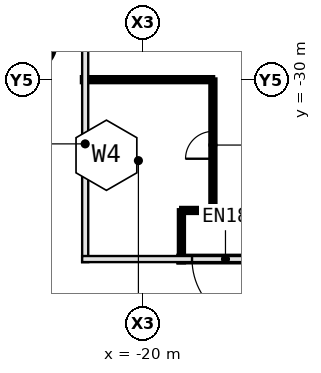
"""IFC4 building model, lengths in metres.
Left out: names, types, materials, properties, quantities, classifications, styles, units other than length and angle.
Written with IfcOpenShell. Run it as: python <this file> out.ifc"""

import sys

from ifc_helpers import new_model, si_unit, direction, frame, frame_2d, origin, origin_2d, place, context, subcontext, project, spatial, rectangle, circle, extrude, element, fill, save


model = new_model("IFC4")
c1 = context("Model", 3, precision=1e-05, world=origin(), true_north=direction((0.0, 1.0)))
c2 = subcontext(c1, "Body", "Model", "MODEL_VIEW")
j1 = project(units=[si_unit("LENGTHUNIT", "METRE"), si_unit("PLANEANGLEUNIT", "RADIAN")], contexts=[c1])
p1 = place(None, origin())
s1 = spatial("IfcSite", under=j1, at=p1, CompositionType="ELEMENT")
p2 = place(p1, origin())
s2 = spatial("IfcBuilding", under=s1, at=p2, CompositionType="ELEMENT")
p3 = place(p2, origin())
s3 = spatial("IfcBuildingStorey", under=s2, at=p3, CompositionType="ELEMENT", Elevation=0.0)
p4 = place(p3, frame((-23.782, -28.799, 0.0), z_axis=(0.0, 0.0, 1.0), x_axis=(-0.819152044289, -0.573576436351, 0.0)))
e1 = element("IfcColumn", 1, at=p4, inside=s3, PredefinedType="COLUMN", context=c2, shape_type="SweptSolid", body=[
    extrude(circle(Radius=0.9, at=origin_2d()), origin(), (0.0, 0.0, 1.0), 9.0),
])
p5 = place(p3, frame((-15.744, -35.9, 0.0), z_axis=(0.0, 0.0, 1.0), x_axis=(-1.0, 0.0, 0.0)))
e2 = element("IfcWall", 2, at=p5, inside=s3, PredefinedType="SOLIDWALL", context=c2, shape_type="SweptSolid", body=[
    extrude(rectangle(XDim=3.083, YDim=0.2, at=frame_2d((1.542, 0.0))), origin(), (0.0, 0.0, 1.0), 2.7),
])
p6 = place(p5, frame((0.441, 0.0, 0.0)))
e3 = element("IfcOpeningElement", 3, at=p6, cuts=e2, PredefinedType="OPENING", context=c2, shape_type="SweptSolid", body=[
    extrude(rectangle(XDim=2.2, YDim=2.4, at=frame_2d((1.1, 1.2))), frame((0.0, 0.11, 0.0), z_axis=(0.0, -1.0, 0.0), x_axis=(1.0, 0.0, 0.0)), (0.0, 0.0, 1.0), 0.22),
])
p7 = place(p3, frame((-18.735, -36.0, 0.0), z_axis=(0.0, 0.0, 1.0), x_axis=(0.0, 1.0, 0.0)))
e4 = element("IfcWall", 4, at=p7, inside=s3, PredefinedType="PARTITIONING", context=c2, shape_type="SweptSolid", body=[
    extrude(rectangle(XDim=1.699, YDim=0.15, at=frame_2d((0.85, 0.0))), origin(), (0.0, 0.0, 1.0), 8.6),
])
p8 = place(p3, frame((-18.735, -34.301, 0.0), z_axis=(0.0, 0.0, 1.0), x_axis=(1.0, 0.0, 0.0)))
e5 = element("IfcWall", 5, at=p8, inside=s3, PredefinedType="PARTITIONING", context=c2, shape_type="SweptSolid", body=[
    extrude(rectangle(XDim=1.035, YDim=0.15, at=frame_2d((0.517, 0.0))), origin(), (0.0, 0.0, 1.0), 8.6),
])
p9 = place(p3, frame((-17.699, -34.3, 0.0), z_axis=(0.0, 0.0, 1.0), x_axis=(0.0, 1.0, 0.0)))
e6 = element("IfcWall", 6, at=p9, inside=s3, PredefinedType="PARTITIONING", context=c2, shape_type="SweptSolid", body=[
    extrude(rectangle(XDim=4.3, YDim=0.15, at=frame_2d((2.15, 0.0))), origin(), (0.0, 0.0, 1.0), 8.6),
])
p10 = place(p9, frame((1.7, 0.0, 0.0)))
e7 = element("IfcOpeningElement", 7, at=p10, cuts=e6, PredefinedType="OPENING", context=c2, shape_type="SweptSolid", body=[
    extrude(rectangle(XDim=0.9, YDim=2.1, at=frame_2d((0.45, 1.05))), frame((0.0, 0.085, 0.0), z_axis=(0.0, -1.0, 0.0), x_axis=(1.0, 0.0, 0.0)), (0.0, 0.0, 1.0), 0.17),
])
p11 = place(p3, frame((-17.7, -29.999, 0.0), z_axis=(0.0, 0.0, 1.0), x_axis=(-1.0, 0.0, 0.0)))
e8 = element("IfcWall", 8, at=p11, inside=s3, PredefinedType="PARTITIONING", context=c2, shape_type="SweptSolid", body=[
    extrude(rectangle(XDim=4.3, YDim=0.15, at=frame_2d((2.15, 0.0))), origin(), (0.0, 0.0, 1.0), 8.6),
])
p12 = place(p6, origin())
e9 = element("IfcDoor", 9, at=p12, inside=s3, OperationType="DOUBLE_DOOR_DOUBLE_SWING", PredefinedType="DOOR", context=c2, shape_type="SweptSolid", body=[
    extrude(rectangle(XDim=2.2, YDim=2.4, at=frame_2d((1.1, 1.2))), frame((0.0, 0.025, 0.0), z_axis=(0.0, -1.0, 0.0), x_axis=(1.0, 0.0, 0.0)), (0.0, 0.0, 1.0), 0.05),
])
fill(e3, e9)
p13 = place(p10, origin())
e10 = element("IfcDoor", 10, at=p13, inside=s3, OperationType="SINGLE_SWING_LEFT", PredefinedType="DOOR", context=c2, shape_type="SweptSolid", body=[
    extrude(rectangle(XDim=0.9, YDim=2.1, at=frame_2d((0.45, 1.05))), frame((0.0, 0.025, 0.0), z_axis=(0.0, -1.0, 0.0), x_axis=(1.0, 0.0, 0.0)), (0.0, 0.0, 1.0), 0.05),
])
fill(e7, e10)
save(model, sys.argv[1])
